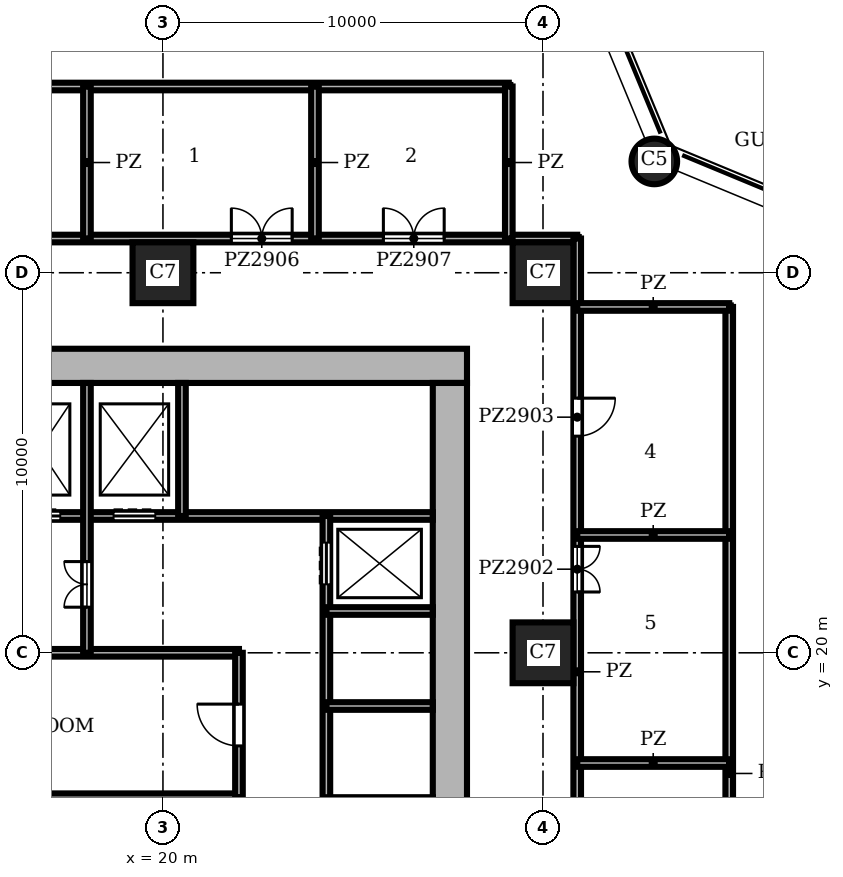
"""IFC4 building model, lengths in metres.
Left out: names, types, materials, properties, quantities, classifications, styles, units other than length and angle.
Written with IfcOpenShell. Run it as: python <this file> out.ifc"""

import sys

from ifc_helpers import new_model, si_unit, direction, frame, frame_2d, origin, origin_2d, place, context, subcontext, project, spatial, rectangle, circle, extrude, element, fill, save


model = new_model("IFC4")
c1 = context("Model", 3, precision=1e-05, world=origin(), true_north=direction((0.0, 1.0)))
c2 = subcontext(c1, "Body", "Model", "MODEL_VIEW")
j1 = project(units=[si_unit("LENGTHUNIT", "METRE"), si_unit("PLANEANGLEUNIT", "RADIAN")], contexts=[c1])
p1 = place(None, origin())
s1 = spatial("IfcSite", under=j1, at=p1, CompositionType="ELEMENT")
p2 = place(p1, origin())
s2 = spatial("IfcBuilding", under=s1, at=p2, CompositionType="ELEMENT")
p3 = place(p2, frame((0.0, 0.0, 117.3)))
s3 = spatial("IfcBuildingStorey", under=s2, at=p3, CompositionType="ELEMENT", Elevation=117.3)
p4 = place(p3, frame((32.929, 32.929, 0.0), z_axis=(0.0, 0.0, 1.0), x_axis=(1.0, 0.0, 0.0)))
e1 = element("IfcColumn", 1, at=p4, inside=s3, PredefinedType="COLUMN", context=c2, shape_type="SweptSolid", body=[
    extrude(circle(Radius=0.6, at=origin_2d()), origin(), (0.0, 0.0, 1.0), 9.0),
])
for number, where, z_axis, x_axis in (
    (2, (20.0, 30.0, 0.0), (0.0, 0.0, 1.0), (1.0, 0.0, 0.0)),
    (3, (30.0, 20.0, 0.0), (0.0, 0.0, 1.0), (1.0, 0.0, 0.0)),
    (4, (30.0, 30.0, 0.0), (0.0, 0.0, 1.0), (1.0, 0.0, 0.0)),
):
    element("IfcColumn", number, at=place(p3, frame(where, z_axis=z_axis, x_axis=x_axis)), inside=s3, PredefinedType="COLUMN", context=c2, shape_type="SweptSolid", body=[
        extrude(rectangle(XDim=1.6, YDim=1.6, at=origin_2d()), origin(), (0.0, 0.0, 1.0), 9.0),
    ])
p5 = place(p3, frame((27.55, 8.9, 0.0), z_axis=(0.0, 0.0, 1.0), x_axis=(0.0, 1.0, 0.0)))
e5 = element("IfcWall", 5, at=p5, inside=s3, PredefinedType="SHEAR", context=c2, shape_type="SweptSolid", body=[
    extrude(rectangle(XDim=18.2, YDim=0.9, at=frame_2d((9.1, 0.0))), origin(), (0.0, 0.0, 1.0), 9.0),
])
p6 = place(p5, frame((4.55, 0.0, 0.0)))
e6 = element("IfcOpeningElement", 6, at=p6, cuts=e5, PredefinedType="OPENING", context=c2, shape_type="SweptSolid", body=[
    extrude(rectangle(XDim=1.6, YDim=2.1, at=frame_2d((0.8, 1.05))), frame((0.0, 0.46, 0.0), z_axis=(0.0, -1.0, 0.0), x_axis=(1.0, 0.0, 0.0)), (0.0, 0.0, 1.0), 0.92),
])
p7 = place(p3, frame((28.0, 27.55, 0.0), z_axis=(0.0, 0.0, 1.0), x_axis=(-1.0, 0.0, 0.0)))
e7 = element("IfcWall", 7, at=p7, inside=s3, PredefinedType="SHEAR", context=c2, shape_type="SweptSolid", body=[
    extrude(rectangle(XDim=20.0, YDim=0.9, at=frame_2d((10.0, 0.0))), origin(), (0.0, 0.0, 1.0), 9.0),
])
p8 = place(p3, frame((24.3, 16.1, 0.0), z_axis=(0.0, 0.0, 1.0), x_axis=(1.0, 0.0, 0.0)))
e8 = element("IfcWall", 8, at=p8, inside=s3, PredefinedType="SHEAR", context=c2, shape_type="SweptSolid", body=[
    extrude(rectangle(XDim=2.8, YDim=0.2, at=frame_2d((1.4, 0.0))), origin(), (0.0, 0.0, 1.0), 8.55),
])
p9 = place(p3, frame((14.0, 16.2, 0.0), z_axis=(0.0, 0.0, 1.0), x_axis=(1.0, 0.0, 0.0)))
e9 = element("IfcWall", 9, at=p9, inside=s3, PredefinedType="SHEAR", context=c2, shape_type="SweptSolid", body=[
    extrude(rectangle(XDim=8.0, YDim=0.2, at=frame_2d((4.0, 0.0))), origin(), (0.0, 0.0, 1.0), 8.55),
])
p10 = place(p3, frame((24.3, 18.6, 0.0), z_axis=(0.0, 0.0, 1.0), x_axis=(1.0, 0.0, 0.0)))
e10 = element("IfcWall", 10, at=p10, inside=s3, PredefinedType="SHEAR", context=c2, shape_type="SweptSolid", body=[
    extrude(rectangle(XDim=2.8, YDim=0.2, at=frame_2d((1.4, 0.0))), origin(), (0.0, 0.0, 1.0), 8.55),
])
p11 = place(p3, frame((13.3, 20.0, 0.0), z_axis=(0.0, 0.0, 1.0), x_axis=(1.0, 0.0, 0.0)))
e11 = element("IfcWall", 11, at=p11, inside=s3, PredefinedType="SHEAR", context=c2, shape_type="SweptSolid", body=[
    extrude(rectangle(XDim=8.7, YDim=0.2, at=frame_2d((4.35, 0.0))), origin(), (0.0, 0.0, 1.0), 8.55),
])
p12 = place(p3, frame((24.3, 21.1, 0.0), z_axis=(0.0, 0.0, 1.0), x_axis=(1.0, 0.0, 0.0)))
e12 = element("IfcWall", 12, at=p12, inside=s3, PredefinedType="SHEAR", context=c2, shape_type="SweptSolid", body=[
    extrude(rectangle(XDim=2.8, YDim=0.2, at=frame_2d((1.4, 0.0))), origin(), (0.0, 0.0, 1.0), 8.55),
])
p13 = place(p3, frame((13.8, 23.6, 0.0), z_axis=(0.0, 0.0, 1.0), x_axis=(1.0, 0.0, 0.0)))
e13 = element("IfcWall", 13, at=p13, inside=s3, PredefinedType="SHEAR", context=c2, shape_type="SweptSolid", body=[
    extrude(rectangle(XDim=13.3, YDim=0.2, at=frame_2d((6.65, 0.0))), origin(), (0.0, 0.0, 1.0), 8.55),
])
p14 = place(p13, frame((2.4, 0.0, 0.0)))
e14 = element("IfcOpeningElement", 14, at=p14, cuts=e13, PredefinedType="OPENING", context=c2, shape_type="SweptSolid", body=[
    extrude(rectangle(XDim=1.1, YDim=2.1, at=frame_2d((0.55, 1.05))), frame((0.0, 0.11, 0.0), z_axis=(0.0, -1.0, 0.0), x_axis=(1.0, 0.0, 0.0)), (0.0, 0.0, 1.0), 0.22),
])
p15 = place(p13, frame((4.9, 0.0, 0.0)))
e15 = element("IfcOpeningElement", 15, at=p15, cuts=e13, PredefinedType="OPENING", context=c2, shape_type="SweptSolid", body=[
    extrude(rectangle(XDim=1.1, YDim=2.1, at=frame_2d((0.55, 1.05))), frame((0.0, 0.11, 0.0), z_axis=(0.0, -1.0, 0.0), x_axis=(1.0, 0.0, 0.0)), (0.0, 0.0, 1.0), 0.22),
])
p16 = place(p13, frame((0.25, 0.0, 0.0)))
e16 = element("IfcOpeningElement", 16, at=p16, cuts=e13, PredefinedType="OPENING", context=c2, shape_type="SweptSolid", body=[
    extrude(rectangle(XDim=1.0, YDim=2.1, at=frame_2d((0.5, 1.05))), frame((0.0, 0.11, 0.0), z_axis=(0.0, -1.0, 0.0), x_axis=(1.0, 0.0, 0.0)), (0.0, 0.0, 1.0), 0.22),
])
p17 = place(p3, frame((18.0, 20.0, 0.0), z_axis=(0.0, 0.0, 1.0), x_axis=(0.0, 1.0, 0.0)))
e17 = element("IfcWall", 17, at=p17, inside=s3, PredefinedType="SHEAR", context=c2, shape_type="SweptSolid", body=[
    extrude(rectangle(XDim=7.1, YDim=0.2, at=frame_2d((3.55, 0.0))), origin(), (0.0, 0.0, 1.0), 8.55),
])
p18 = place(p17, frame((1.2, 0.0, 0.0)))
e18 = element("IfcOpeningElement", 18, at=p18, cuts=e17, PredefinedType="OPENING", context=c2, shape_type="SweptSolid", body=[
    extrude(rectangle(XDim=1.2, YDim=2.1, at=frame_2d((0.6, 1.05))), frame((0.0, 0.11, 0.0), z_axis=(0.0, -1.0, 0.0), x_axis=(1.0, 0.0, 0.0)), (0.0, 0.0, 1.0), 0.22),
])
p19 = place(p3, frame((20.5, 23.6, 0.0), z_axis=(0.0, 0.0, 1.0), x_axis=(0.0, 1.0, 0.0)))
e19 = element("IfcWall", 19, at=p19, inside=s3, PredefinedType="SHEAR", context=c2, shape_type="SweptSolid", body=[
    extrude(rectangle(XDim=3.5, YDim=0.2, at=frame_2d((1.75, 0.0))), origin(), (0.0, 0.0, 1.0), 8.55),
])
p20 = place(p3, frame((22.0, 16.2, 0.0), z_axis=(0.0, 0.0, 1.0), x_axis=(0.0, 1.0, 0.0)))
e20 = element("IfcWall", 20, at=p20, inside=s3, PredefinedType="SHEAR", context=c2, shape_type="SweptSolid", body=[
    extrude(rectangle(XDim=3.8, YDim=0.2, at=frame_2d((1.9, 0.0))), origin(), (0.0, 0.0, 1.0), 8.55),
])
p21 = place(p20, frame((1.35, 0.0, 0.0)))
e21 = element("IfcOpeningElement", 21, at=p21, cuts=e20, PredefinedType="OPENING", context=c2, shape_type="SweptSolid", body=[
    extrude(rectangle(XDim=1.1, YDim=2.1, at=frame_2d((0.55, 1.05))), frame((0.0, 0.11, 0.0), z_axis=(0.0, -1.0, 0.0), x_axis=(1.0, 0.0, 0.0)), (0.0, 0.0, 1.0), 0.22),
])
p22 = place(p3, frame((24.3, 16.1, 0.0), z_axis=(0.0, 0.0, 1.0), x_axis=(0.0, 1.0, 0.0)))
e22 = element("IfcWall", 22, at=p22, inside=s3, PredefinedType="SHEAR", context=c2, shape_type="SweptSolid", body=[
    extrude(rectangle(XDim=7.5, YDim=0.2, at=frame_2d((3.75, 0.0))), origin(), (0.0, 0.0, 1.0), 8.55),
])
p23 = place(p22, frame((5.7, 0.0, 0.0)))
e23 = element("IfcOpeningElement", 23, at=p23, cuts=e22, PredefinedType="OPENING", context=c2, shape_type="SweptSolid", body=[
    extrude(rectangle(XDim=1.1, YDim=2.1, at=frame_2d((0.55, 1.05))), frame((0.0, 0.11, 0.0), z_axis=(0.0, -1.0, 0.0), x_axis=(1.0, 0.0, 0.0)), (0.0, 0.0, 1.0), 0.22),
])
p24 = place(p3, frame((2.0, 30.9, 0.0), z_axis=(0.0, 0.0, 1.0), x_axis=(1.0, 0.0, 0.0)))
e24 = element("IfcWall", 24, at=p24, inside=s3, PredefinedType="PARTITIONING", context=c2, shape_type="SweptSolid", body=[
    extrude(rectangle(XDim=28.9, YDim=0.2, at=frame_2d((14.45, 0.0))), origin(), (0.0, 0.0, 1.0), 8.55),
])
p25 = place(p24, frame((4.2, 0.0, 0.0)))
e25 = element("IfcOpeningElement", 25, at=p25, cuts=e24, PredefinedType="OPENING", context=c2, shape_type="SweptSolid", body=[
    extrude(rectangle(XDim=1.6, YDim=2.1, at=frame_2d((0.8, 1.05))), frame((0.0, 0.11, 0.0), z_axis=(0.0, -1.0, 0.0), x_axis=(1.0, 0.0, 0.0)), (0.0, 0.0, 1.0), 0.22),
])
p26 = place(p24, frame((12.5, 0.0, 0.0)))
e26 = element("IfcOpeningElement", 26, at=p26, cuts=e24, PredefinedType="OPENING", context=c2, shape_type="SweptSolid", body=[
    extrude(rectangle(XDim=1.0, YDim=2.1, at=frame_2d((0.5, 1.05))), frame((0.0, 0.11, 0.0), z_axis=(0.0, -1.0, 0.0), x_axis=(1.0, 0.0, 0.0)), (0.0, 0.0, 1.0), 0.22),
])
p27 = place(p24, frame((19.8, 0.0, 0.0)))
e27 = element("IfcOpeningElement", 27, at=p27, cuts=e24, PredefinedType="OPENING", context=c2, shape_type="SweptSolid", body=[
    extrude(rectangle(XDim=1.6, YDim=2.1, at=frame_2d((0.8, 1.05))), frame((0.0, 0.11, 0.0), z_axis=(0.0, -1.0, 0.0), x_axis=(1.0, 0.0, 0.0)), (0.0, 0.0, 1.0), 0.22),
])
p28 = place(p24, frame((23.8, 0.0, 0.0)))
e28 = element("IfcOpeningElement", 28, at=p28, cuts=e24, PredefinedType="OPENING", context=c2, shape_type="SweptSolid", body=[
    extrude(rectangle(XDim=1.6, YDim=2.1, at=frame_2d((0.8, 1.05))), frame((0.0, 0.11, 0.0), z_axis=(0.0, -1.0, 0.0), x_axis=(1.0, 0.0, 0.0)), (0.0, 0.0, 1.0), 0.22),
])
p29 = place(p3, frame((2.0, 34.9, 0.0), z_axis=(0.0, 0.0, 1.0), x_axis=(1.0, 0.0, 0.0)))
e29 = element("IfcWall", 29, at=p29, inside=s3, PredefinedType="PARTITIONING", context=c2, shape_type="SweptSolid", body=[
    extrude(rectangle(XDim=27.1, YDim=0.2, at=frame_2d((13.55, 0.0))), origin(), (0.0, 0.0, 1.0), 8.55),
])
for number, where, z_axis, x_axis in (
    (30, (30.9, 17.1, 0.0), (0.0, 0.0, 1.0), (1.0, 0.0, 0.0)),
    (31, (30.9, 23.1, 0.0), (0.0, 0.0, 1.0), (1.0, 0.0, 0.0)),
    (32, (30.9, 29.1, 0.0), (0.0, 0.0, 1.0), (1.0, 0.0, 0.0)),
    (33, (18.0, 30.9, 0.0), (0.0, 0.0, 1.0), (0.0, 1.0, 0.0)),
    (34, (24.0, 30.9, 0.0), (0.0, 0.0, 1.0), (0.0, 1.0, 0.0)),
    (35, (29.1, 30.9, 0.0), (0.0, 0.0, 1.0), (0.0, 1.0, 0.0)),
):
    element("IfcWall", number, at=place(p3, frame(where, z_axis=z_axis, x_axis=x_axis)), inside=s3, PredefinedType="PARTITIONING", context=c2, shape_type="SweptSolid", body=[
        extrude(rectangle(XDim=4.0, YDim=0.2, at=frame_2d((2.0, 0.0))), origin(), (0.0, 0.0, 1.0), 8.55),
    ])
p30 = place(p3, frame((30.9, 8.1, 0.0), z_axis=(0.0, 0.0, 1.0), x_axis=(0.0, 1.0, 0.0)))
e36 = element("IfcWall", 36, at=p30, inside=s3, PredefinedType="PARTITIONING", context=c2, shape_type="SweptSolid", body=[
    extrude(rectangle(XDim=22.8, YDim=0.2, at=frame_2d((11.4, 0.0))), origin(), (0.0, 0.0, 1.0), 8.55),
])
p31 = place(p30, frame((4.5, 0.0, 0.0)))
e37 = element("IfcOpeningElement", 37, at=p31, cuts=e36, PredefinedType="OPENING", context=c2, shape_type="SweptSolid", body=[
    extrude(rectangle(XDim=1.6, YDim=2.1, at=frame_2d((0.8, 1.05))), frame((0.0, 0.11, 0.0), z_axis=(0.0, -1.0, 0.0), x_axis=(1.0, 0.0, 0.0)), (0.0, 0.0, 1.0), 0.22),
])
p32 = place(p30, frame((13.5, 0.0, 0.0)))
e38 = element("IfcOpeningElement", 38, at=p32, cuts=e36, PredefinedType="OPENING", context=c2, shape_type="SweptSolid", body=[
    extrude(rectangle(XDim=1.2, YDim=2.1, at=frame_2d((0.6, 1.05))), frame((0.0, 0.11, 0.0), z_axis=(0.0, -1.0, 0.0), x_axis=(1.0, 0.0, 0.0)), (0.0, 0.0, 1.0), 0.22),
])
p33 = place(p30, frame((17.6, 0.0, 0.0)))
e39 = element("IfcOpeningElement", 39, at=p33, cuts=e36, PredefinedType="OPENING", context=c2, shape_type="SweptSolid", body=[
    extrude(rectangle(XDim=1.0, YDim=2.1, at=frame_2d((0.5, 1.05))), frame((0.0, 0.11, 0.0), z_axis=(0.0, -1.0, 0.0), x_axis=(1.0, 0.0, 0.0)), (0.0, 0.0, 1.0), 0.22),
])
p34 = place(p3, frame((34.9, 4.55, 0.0), z_axis=(0.0, 0.0, 1.0), x_axis=(0.0, 1.0, 0.0)))
e40 = element("IfcWall", 40, at=p34, inside=s3, PredefinedType="PARTITIONING", context=c2, shape_type="SweptSolid", body=[
    extrude(rectangle(XDim=24.55, YDim=0.2, at=frame_2d((12.275, 0.0))), origin(), (0.0, 0.0, 1.0), 8.55),
])
p35 = place(p23, origin())
e41 = element("IfcDoor", 41, at=p35, inside=s3, OperationType="DOUBLE_DOOR_SLIDING", PredefinedType="DOOR", context=c2, shape_type="SweptSolid", body=[
    extrude(rectangle(XDim=1.1, YDim=2.1, at=frame_2d((0.55, 1.05))), frame((0.0, 0.025, 0.0), z_axis=(0.0, -1.0, 0.0), x_axis=(1.0, 0.0, 0.0)), (0.0, 0.0, 1.0), 0.05),
])
fill(e23, e41)
p36 = place(p14, origin())
e42 = element("IfcDoor", 42, at=p36, inside=s3, OperationType="DOUBLE_DOOR_SLIDING", PredefinedType="DOOR", context=c2, shape_type="SweptSolid", body=[
    extrude(rectangle(XDim=1.1, YDim=2.1, at=frame_2d((0.55, 1.05))), frame((0.0, 0.025, 0.0), z_axis=(0.0, -1.0, 0.0), x_axis=(1.0, 0.0, 0.0)), (0.0, 0.0, 1.0), 0.05),
])
fill(e14, e42)
p37 = place(p15, origin())
e43 = element("IfcDoor", 43, at=p37, inside=s3, OperationType="DOUBLE_DOOR_SLIDING", PredefinedType="DOOR", context=c2, shape_type="SweptSolid", body=[
    extrude(rectangle(XDim=1.1, YDim=2.1, at=frame_2d((0.55, 1.05))), frame((0.0, 0.025, 0.0), z_axis=(0.0, -1.0, 0.0), x_axis=(1.0, 0.0, 0.0)), (0.0, 0.0, 1.0), 0.05),
])
fill(e15, e43)
p38 = place(p18, origin())
e44 = element("IfcDoor", 44, at=p38, inside=s3, OperationType="DOUBLE_DOOR_SINGLE_SWING", PredefinedType="DOOR", context=c2, shape_type="SweptSolid", body=[
    extrude(rectangle(XDim=1.2, YDim=2.1, at=frame_2d((0.6, 1.05))), frame((0.0, 0.025, 0.0), z_axis=(0.0, -1.0, 0.0), x_axis=(1.0, 0.0, 0.0)), (0.0, 0.0, 1.0), 0.05),
])
fill(e18, e44)
p39 = place(p21, origin())
e45 = element("IfcDoor", 45, at=p39, inside=s3, OperationType="SINGLE_SWING_RIGHT", PredefinedType="DOOR", context=c2, shape_type="SweptSolid", body=[
    extrude(rectangle(XDim=1.1, YDim=2.1, at=frame_2d((0.55, 1.05))), frame((0.0, 0.025, 0.0), z_axis=(0.0, -1.0, 0.0), x_axis=(1.0, 0.0, 0.0)), (0.0, 0.0, 1.0), 0.05),
])
fill(e21, e45)
p40 = place(p32, frame((1.2, 0.0, 0.0), z_axis=(0.0, 0.0, 1.0), x_axis=(-1.0, 0.0, 0.0)))
e46 = element("IfcDoor", 46, at=p40, inside=s3, OperationType="DOUBLE_DOOR_SINGLE_SWING", PredefinedType="DOOR", context=c2, shape_type="SweptSolid", body=[
    extrude(rectangle(XDim=1.2, YDim=2.1, at=frame_2d((0.6, 1.05))), frame((0.0, 0.025, 0.0), z_axis=(0.0, -1.0, 0.0), x_axis=(1.0, 0.0, 0.0)), (0.0, 0.0, 1.0), 0.05),
])
fill(e38, e46)
p41 = place(p33, frame((1.0, 0.0, 0.0), z_axis=(0.0, 0.0, 1.0), x_axis=(-1.0, 0.0, 0.0)))
e47 = element("IfcDoor", 47, at=p41, inside=s3, OperationType="SINGLE_SWING_LEFT", PredefinedType="DOOR", context=c2, shape_type="SweptSolid", body=[
    extrude(rectangle(XDim=1.0, YDim=2.1, at=frame_2d((0.5, 1.05))), frame((0.0, 0.025, 0.0), z_axis=(0.0, -1.0, 0.0), x_axis=(1.0, 0.0, 0.0)), (0.0, 0.0, 1.0), 0.05),
])
fill(e39, e47)
p42 = place(p27, origin())
e48 = element("IfcDoor", 48, at=p42, inside=s3, OperationType="DOUBLE_DOOR_DOUBLE_SWING", PredefinedType="DOOR", context=c2, shape_type="SweptSolid", body=[
    extrude(rectangle(XDim=1.6, YDim=2.1, at=frame_2d((0.8, 1.05))), frame((0.0, 0.025, 0.0), z_axis=(0.0, -1.0, 0.0), x_axis=(1.0, 0.0, 0.0)), (0.0, 0.0, 1.0), 0.05),
])
fill(e27, e48)
p43 = place(p28, origin())
e49 = element("IfcDoor", 49, at=p43, inside=s3, OperationType="DOUBLE_DOOR_DOUBLE_SWING", PredefinedType="DOOR", context=c2, shape_type="SweptSolid", body=[
    extrude(rectangle(XDim=1.6, YDim=2.1, at=frame_2d((0.8, 1.05))), frame((0.0, 0.025, 0.0), z_axis=(0.0, -1.0, 0.0), x_axis=(1.0, 0.0, 0.0)), (0.0, 0.0, 1.0), 0.05),
])
fill(e28, e49)
save(model, sys.argv[1])
